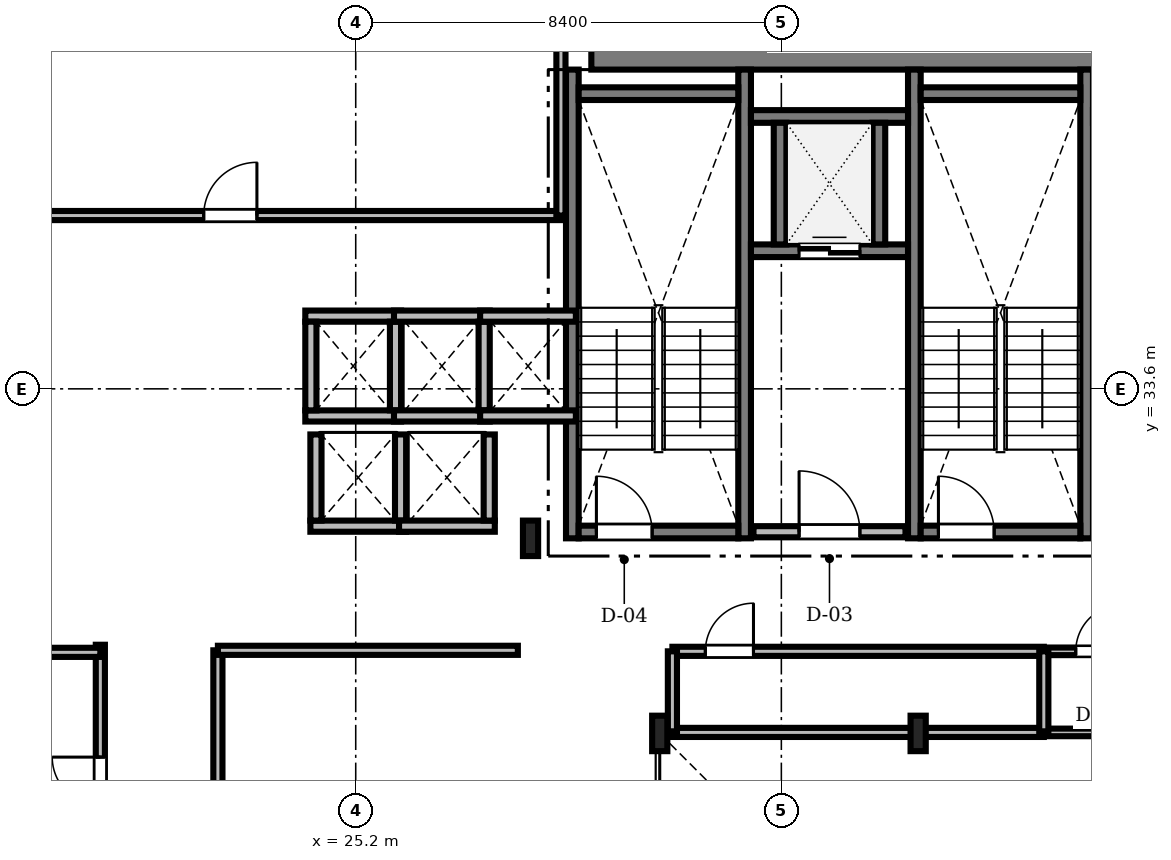
"""IFC4 building model, lengths in metres.
Left out: names, types, materials, properties, quantities, classifications, styles, units other than length and angle.
Written with IfcOpenShell. Run it as: python <this file> out.ifc"""

import sys

from ifc_helpers import new_model, si_unit, direction, frame, frame_2d, origin, origin_2d, place, context, subcontext, project, spatial, rectangle, i_section, extrude, source, transform, mapped, element, fill, save


model = new_model("IFC4")
c1 = context("Model", 3, precision=1e-05, world=origin(), true_north=direction((0.0, 1.0)))
c2 = subcontext(c1, "Body", "Model", "MODEL_VIEW")
j1 = project(units=[si_unit("LENGTHUNIT", "METRE"), si_unit("PLANEANGLEUNIT", "RADIAN")], contexts=[c1])
p1 = place(None, origin())
s1 = spatial("IfcSite", under=j1, at=p1, CompositionType="ELEMENT")
p2 = place(p1, origin())
s2 = spatial("IfcBuilding", under=s1, at=p2, CompositionType="ELEMENT")
p3 = place(p2, frame((0.0, 0.0, 177.2)))
s3 = spatial("IfcBuildingStorey", under=s2, at=p3, CompositionType="ELEMENT", Elevation=177.2)
m1 = source(origin(), c2, "Body", "SweptSolid", [
    extrude(rectangle(XDim=17.52, YDim=0.8, at=frame_2d((8.76, 0.0))), origin(), (0.0, 0.0, 1.0), 3.58),
])
p4 = place(p3, frame((29.85, 40.3, 0.0), z_axis=(0.0, 0.0, 1.0), x_axis=(1.0, 0.0, 0.0)))
e1 = element("IfcWall", 1, at=p4, inside=s3, PredefinedType="SHEAR", context=c2, shape_type="MappedRepresentation", body=[
    mapped(m1, transform((0.0, 0.0, 0.0), scale=1.0)),
])
m2 = source(origin(), c2, "Body", "SweptSolid", [
    extrude(i_section(OverallWidth=0.3, OverallDepth=0.7, WebThickness=0.017, FlangeThickness=0.032, FilletRadius=0.027, at=origin_2d()), origin(), (0.0, 0.0, 1.0), 3.58),
])
for number, where, z_axis, x_axis in (
    (2, (36.3, 26.8, 0.0), (0.0, 0.0, 1.0), (1.0, 0.0, 0.0)),
    (3, (31.2, 26.8, 0.0), (0.0, 0.0, 1.0), (1.0, 0.0, 0.0)),
    (4, (28.65, 30.65, 0.0), (0.0, 0.0, 1.0), (1.0, 0.0, 0.0)),
):
    element("IfcColumn", number, at=place(p3, frame(where, z_axis=z_axis, x_axis=x_axis)), inside=s3, PredefinedType="COLUMN", context=c2, shape_type="MappedRepresentation", body=[
        mapped(m2, transform((0.0, 0.0, 0.0), scale=1.0)),
    ])
m3 = source(origin(), c2, "Body", "SweptSolid", [
    extrude(rectangle(XDim=9.25, YDim=0.25, at=frame_2d((4.625, 0.0))), origin(), (0.0, 0.0, 1.0), 3.6),
])
for number, where, z_axis, x_axis in (
    (5, (29.475, 30.65, 0.0), (0.0, 0.0, 1.0), (0.0, 1.0, 0.0)),
    (6, (32.875, 30.65, 0.0), (0.0, 0.0, 1.0), (0.0, 1.0, 0.0)),
):
    element("IfcWall", number, at=place(p3, frame(where, z_axis=z_axis, x_axis=x_axis)), inside=s3, PredefinedType="SOLIDWALL", context=c2, shape_type="MappedRepresentation", body=[
        mapped(m3, transform((0.0, 0.0, 0.0), scale=1.0)),
    ])
m4 = source(origin(), c2, "Body", "SweptSolid", [
    extrude(rectangle(XDim=3.15, YDim=0.25, at=frame_2d((1.575, 0.0))), origin(), (0.0, 0.0, 1.0), 3.6),
])
p5 = place(p3, frame((29.6, 39.425, 0.0), z_axis=(0.0, 0.0, 1.0), x_axis=(1.0, 0.0, 0.0)))
e7 = element("IfcWall", 7, at=p5, inside=s3, PredefinedType="SOLIDWALL", context=c2, shape_type="MappedRepresentation", body=[
    mapped(m4, transform((0.0, 0.0, 0.0), scale=1.0)),
])
p6 = place(p3, frame((29.6, 30.775, 0.0), z_axis=(0.0, 0.0, 1.0), x_axis=(1.0, 0.0, 0.0)))
e8 = element("IfcWall", 8, at=p6, inside=s3, PredefinedType="SOLIDWALL", context=c2, shape_type="MappedRepresentation", body=[
    mapped(m4, transform((0.0, 0.0, 0.0), scale=1.0)),
])
m5 = source(origin(), c2, "Body", "SweptSolid", [
    extrude(rectangle(XDim=1.1, YDim=2.2, at=frame_2d((0.55, 1.1))), frame((0.0, 0.135, 0.0), z_axis=(0.0, -1.0, 0.0), x_axis=(1.0, 0.0, 0.0)), (0.0, 0.0, 1.0), 0.27),
])
p7 = place(p6, frame((0.35, 0.0, 0.0)))
e9 = element("IfcOpeningElement", 9, at=p7, cuts=e8, PredefinedType="OPENING", context=c2, shape_type="MappedRepresentation", body=[
    mapped(m5, transform((0.0, 0.0, 0.0), scale=1.0)),
])
for number, where, z_axis, x_axis in (
    (10, (36.225, 30.65, 0.0), (0.0, 0.0, 1.0), (0.0, 1.0, 0.0)),
    (11, (39.625, 30.65, 0.0), (0.0, 0.0, 1.0), (0.0, 1.0, 0.0)),
):
    element("IfcWall", number, at=place(p3, frame(where, z_axis=z_axis, x_axis=x_axis)), inside=s3, PredefinedType="SOLIDWALL", context=c2, shape_type="MappedRepresentation", body=[
        mapped(m3, transform((0.0, 0.0, 0.0), scale=1.0)),
    ])
p8 = place(p3, frame((36.35, 39.425, 0.0), z_axis=(0.0, 0.0, 1.0), x_axis=(1.0, 0.0, 0.0)))
e12 = element("IfcWall", 12, at=p8, inside=s3, PredefinedType="SOLIDWALL", context=c2, shape_type="MappedRepresentation", body=[
    mapped(m4, transform((0.0, 0.0, 0.0), scale=1.0)),
])
p9 = place(p3, frame((36.35, 30.775, 0.0), z_axis=(0.0, 0.0, 1.0), x_axis=(1.0, 0.0, 0.0)))
e13 = element("IfcWall", 13, at=p9, inside=s3, PredefinedType="SOLIDWALL", context=c2, shape_type="MappedRepresentation", body=[
    mapped(m4, transform((0.0, 0.0, 0.0), scale=1.0)),
])
p10 = place(p9, frame((0.35, 0.0, 0.0)))
e14 = element("IfcOpeningElement", 14, at=p10, cuts=e13, PredefinedType="OPENING", context=c2, shape_type="MappedRepresentation", body=[
    mapped(m5, transform((0.0, 0.0, 0.0), scale=1.0)),
])
m6 = source(origin(), c2, "Body", "SweptSolid", [
    extrude(rectangle(XDim=3.0, YDim=0.22, at=frame_2d((1.5, 0.0))), origin(), (0.0, 0.0, 1.0), 3.58),
])
p11 = place(p3, frame((33.05, 30.78, 0.0), z_axis=(0.0, 0.0, 1.0), x_axis=(1.0, 0.0, 0.0)))
e15 = element("IfcWall", 15, at=p11, inside=s3, PredefinedType="SOLIDWALL", context=c2, shape_type="MappedRepresentation", body=[
    mapped(m6, transform((0.0, 0.0, 0.0), scale=1.0)),
])
m7 = source(origin(), c2, "Body", "SweptSolid", [
    extrude(rectangle(XDim=1.2, YDim=2.2, at=frame_2d((0.6, 1.1))), frame((0.0, 0.12, 0.0), z_axis=(0.0, -1.0, 0.0), x_axis=(1.0, 0.0, 0.0)), (0.0, 0.0, 1.0), 0.24),
])
p12 = place(p11, frame((0.9, 0.0, 0.0)))
e16 = element("IfcOpeningElement", 16, at=p12, cuts=e15, PredefinedType="OPENING", context=c2, shape_type="MappedRepresentation", body=[
    mapped(m7, transform((0.0, 0.0, 0.0), scale=1.0)),
])
m8 = source(origin(), c2, "Body", "SweptSolid", [
    extrude(rectangle(XDim=1.89, YDim=0.22, at=frame_2d((0.945, 0.0))), origin(), (0.0, 0.0, 1.0), 3.58),
])
for number, where, z_axis, x_axis in (
    (17, (24.205, 33.065, 0.0), (0.0, 0.0, 1.0), (1.0, 0.0, 0.0)),
    (18, (24.205, 35.035, 0.0), (0.0, 0.0, 1.0), (1.0, 0.0, 0.0)),
):
    element("IfcWall", number, at=place(p3, frame(where, z_axis=z_axis, x_axis=x_axis)), inside=s3, PredefinedType="SOLIDWALL", context=c2, shape_type="MappedRepresentation", body=[
        mapped(m8, transform((0.0, 0.0, 0.0), scale=1.0)),
    ])
m9 = source(origin(), c2, "Body", "SweptSolid", [
    extrude(rectangle(XDim=1.75, YDim=0.22, at=frame_2d((0.875, 0.0))), origin(), (0.0, 0.0, 1.0), 3.58),
])
for number, where, z_axis, x_axis in (
    (19, (24.315, 33.175, 0.0), (0.0, 0.0, 1.0), (0.0, 1.0, 0.0)),
    (20, (25.985, 33.175, 0.0), (0.0, 0.0, 1.0), (0.0, 1.0, 0.0)),
):
    element("IfcWall", number, at=place(p3, frame(where, z_axis=z_axis, x_axis=x_axis)), inside=s3, PredefinedType="SOLIDWALL", context=c2, shape_type="MappedRepresentation", body=[
        mapped(m9, transform((0.0, 0.0, 0.0), scale=1.0)),
    ])
for number, where, z_axis, x_axis in (
    (21, (25.955, 33.065, 0.0), (0.0, 0.0, 1.0), (1.0, 0.0, 0.0)),
    (22, (25.955, 35.035, 0.0), (0.0, 0.0, 1.0), (1.0, 0.0, 0.0)),
):
    element("IfcWall", number, at=place(p3, frame(where, z_axis=z_axis, x_axis=x_axis)), inside=s3, PredefinedType="SOLIDWALL", context=c2, shape_type="MappedRepresentation", body=[
        mapped(m8, transform((0.0, 0.0, 0.0), scale=1.0)),
    ])
p13 = place(p3, frame((27.735, 33.175, 0.0), z_axis=(0.0, 0.0, 1.0), x_axis=(0.0, 1.0, 0.0)))
e23 = element("IfcWall", 23, at=p13, inside=s3, PredefinedType="SOLIDWALL", context=c2, shape_type="MappedRepresentation", body=[
    mapped(m9, transform((0.0, 0.0, 0.0), scale=1.0)),
])
for number, where, z_axis, x_axis in (
    (24, (27.655, 33.065, 0.0), (0.0, 0.0, 1.0), (1.0, 0.0, 0.0)),
    (25, (27.655, 35.035, 0.0), (0.0, 0.0, 1.0), (1.0, 0.0, 0.0)),
):
    element("IfcWall", number, at=place(p3, frame(where, z_axis=z_axis, x_axis=x_axis)), inside=s3, PredefinedType="SOLIDWALL", context=c2, shape_type="MappedRepresentation", body=[
        mapped(m8, transform((0.0, 0.0, 0.0), scale=1.0)),
    ])
m10 = source(origin(), c2, "Body", "SweptSolid", [
    extrude(rectangle(XDim=3.1, YDim=0.25, at=frame_2d((1.55, 0.0))), origin(), (0.0, 0.0, 1.0), 3.58),
])
p14 = place(p3, frame((33.0, 36.325, 0.0), z_axis=(0.0, 0.0, 1.0), x_axis=(1.0, 0.0, 0.0)))
e26 = element("IfcWall", 26, at=p14, inside=s3, PredefinedType="SOLIDWALL", context=c2, shape_type="MappedRepresentation", body=[
    mapped(m10, transform((0.0, 0.0, 0.0), scale=1.0)),
])
m11 = source(origin(), c2, "Body", "SweptSolid", [
    extrude(rectangle(XDim=1.2, YDim=2.25, at=frame_2d((0.6, 1.125))), frame((0.0, 0.135, 0.0), z_axis=(0.0, -1.0, 0.0), x_axis=(1.0, 0.0, 0.0)), (0.0, 0.0, 1.0), 0.27),
])
p15 = place(p14, frame((0.95, 0.0, 0.0)))
e27 = element("IfcOpeningElement", 27, at=p15, cuts=e26, PredefinedType="OPENING", context=c2, shape_type="MappedRepresentation", body=[
    mapped(m11, transform((0.0, 0.0, 0.0), scale=1.0)),
])
p16 = place(p3, frame((33.0, 38.975, 0.0), z_axis=(0.0, 0.0, 1.0), x_axis=(1.0, 0.0, 0.0)))
e28 = element("IfcWall", 28, at=p16, inside=s3, PredefinedType="SOLIDWALL", context=c2, shape_type="MappedRepresentation", body=[
    mapped(m10, transform((0.0, 0.0, 0.0), scale=1.0)),
])
m12 = source(origin(), c2, "Body", "SweptSolid", [
    extrude(rectangle(XDim=2.4, YDim=0.25, at=frame_2d((1.2, 0.0))), origin(), (0.0, 0.0, 1.0), 3.58),
])
for number, where, z_axis, x_axis in (
    (29, (33.575, 36.45, 0.0), (0.0, 0.0, 1.0), (0.0, 1.0, 0.0)),
    (30, (35.525, 36.45, 0.0), (0.0, 0.0, 1.0), (0.0, 1.0, 0.0)),
):
    element("IfcWall", number, at=place(p3, frame(where, z_axis=z_axis, x_axis=x_axis)), inside=s3, PredefinedType="SOLIDWALL", context=c2, shape_type="MappedRepresentation", body=[
        mapped(m12, transform((0.0, 0.0, 0.0), scale=1.0)),
    ])
m13 = source(origin(), c2, "Body", "SweptSolid", [
    extrude(rectangle(XDim=1.89, YDim=0.22, at=frame_2d((0.945, 0.0))), origin(), (0.0, 0.0, 1.0), 3.58),
])
p17 = place(p3, frame((24.305, 30.89, 0.0), z_axis=(0.0, 0.0, 1.0), x_axis=(1.0, 0.0, 0.0)))
e31 = element("IfcWall", 31, at=p17, inside=s3, PredefinedType="SOLIDWALL", context=c2, shape_type="MappedRepresentation", body=[
    mapped(m13, transform((0.0, 0.0, 0.0), scale=1.0)),
])
m14 = source(origin(), c2, "Body", "SweptSolid", [
    extrude(rectangle(XDim=1.7, YDim=0.22, at=frame_2d((0.85, 0.0))), origin(), (0.0, 0.0, 1.0), 3.022),
])
for number, where, z_axis, x_axis in (
    (32, (24.415, 31.0, 0.0), (0.0, 0.0, 1.0), (0.0, 1.0, 0.0)),
    (33, (26.085, 31.0, 0.0), (0.0, 0.0, 1.0), (0.0, 1.0, 0.0)),
):
    element("IfcWall", number, at=place(p3, frame(where, z_axis=z_axis, x_axis=x_axis)), inside=s3, PredefinedType="SOLIDWALL", context=c2, shape_type="MappedRepresentation", body=[
        mapped(m14, transform((0.0, 0.0, 0.0), scale=1.0)),
    ])
m15 = source(origin(), c2, "Body", "SweptSolid", [
    extrude(rectangle(XDim=1.89, YDim=0.22, at=frame_2d((0.945, 0.0))), origin(), (0.0, 0.0, 1.0), 3.022),
])
p18 = place(p3, frame((26.055, 30.89, 0.0), z_axis=(0.0, 0.0, 1.0), x_axis=(1.0, 0.0, 0.0)))
e34 = element("IfcWall", 34, at=p18, inside=s3, PredefinedType="SOLIDWALL", context=c2, shape_type="MappedRepresentation", body=[
    mapped(m15, transform((0.0, 0.0, 0.0), scale=1.0)),
])
p19 = place(p3, frame((27.835, 31.0, 0.0), z_axis=(0.0, 0.0, 1.0), x_axis=(0.0, 1.0, 0.0)))
e35 = element("IfcWall", 35, at=p19, inside=s3, PredefinedType="SOLIDWALL", context=c2, shape_type="MappedRepresentation", body=[
    mapped(m14, transform((0.0, 0.0, 0.0), scale=1.0)),
])
m16 = source(origin(), c2, "Body", "SweptSolid", [
    extrude(rectangle(XDim=17.828, YDim=0.18, at=frame_2d((8.914, 0.0))), origin(), (0.0, 0.0, 1.0), 2.822),
])
p20 = place(p3, frame((11.422, 37.02, 0.0), z_axis=(0.0, 0.0, 1.0), x_axis=(1.0, 0.0, 0.0)))
e36 = element("IfcWall", 36, at=p20, inside=s3, PredefinedType="PARTITIONING", context=c2, shape_type="MappedRepresentation", body=[
    mapped(m16, transform((0.0, 0.0, 0.0), scale=1.0)),
])
m17 = source(origin(), c2, "Body", "SweptSolid", [
    extrude(rectangle(XDim=1.05, YDim=2.2, at=frame_2d((0.525, 1.1))), frame((0.0, 0.1, 0.0), z_axis=(0.0, -1.0, 0.0), x_axis=(1.0, 0.0, 0.0)), (0.0, 0.0, 1.0), 0.2),
])
p21 = place(p20, frame((10.778, 0.0, 0.0)))
e37 = element("IfcOpeningElement", 37, at=p21, cuts=e36, PredefinedType="OPENING", context=c2, shape_type="MappedRepresentation", body=[
    mapped(m17, transform((0.0, 0.0, 0.0), scale=1.0)),
])
m18 = source(origin(), c2, "Body", "SweptSolid", [
    extrude(rectangle(XDim=15.04, YDim=0.18, at=frame_2d((7.52, 0.0))), origin(), (0.0, 0.0, 1.0), 3.022),
])
p22 = place(p3, frame((20.16, 13.51, 0.0), z_axis=(0.0, 0.0, 1.0), x_axis=(0.0, 1.0, 0.0)))
e38 = element("IfcWall", 38, at=p22, inside=s3, PredefinedType="PARTITIONING", context=c2, shape_type="MappedRepresentation", body=[
    mapped(m18, transform((0.0, 0.0, 0.0), scale=1.0)),
])
p23 = place(p22, frame((3.202, 0.0, 0.0)))
e39 = element("IfcOpeningElement", 39, at=p23, cuts=e38, PredefinedType="OPENING", context=c2, shape_type="MappedRepresentation", body=[
    mapped(m17, transform((0.0, 0.0, 0.0), scale=1.0)),
])
m19 = source(origin(), c2, "Body", "SweptSolid", [
    extrude(rectangle(XDim=0.95, YDim=2.15, at=frame_2d((0.475, 1.075))), frame((0.0, 0.1, 0.0), z_axis=(0.0, -1.0, 0.0), x_axis=(1.0, 0.0, 0.0)), (0.0, 0.0, 1.0), 0.2),
])
p24 = place(p22, frame((11.873, 0.0, 0.0)))
e40 = element("IfcOpeningElement", 40, at=p24, cuts=e38, PredefinedType="OPENING", context=c2, shape_type="MappedRepresentation", body=[
    mapped(m19, transform((0.0, 0.0, 0.0), scale=1.0)),
])
m20 = source(origin(), c2, "Body", "SweptSolid", [
    extrude(rectangle(XDim=11.94, YDim=0.18, at=frame_2d((5.97, 0.0))), origin(), (0.0, 0.0, 1.0), 3.022),
])
p25 = place(p3, frame((22.48, 16.5, 0.0), z_axis=(0.0, 0.0, 1.0), x_axis=(0.0, 1.0, 0.0)))
e41 = element("IfcWall", 41, at=p25, inside=s3, PredefinedType="PARTITIONING", context=c2, shape_type="MappedRepresentation", body=[
    mapped(m20, transform((0.0, 0.0, 0.0), scale=1.0)),
])
p26 = place(p25, frame((4.5, 0.0, 0.0)))
e42 = element("IfcOpeningElement", 42, at=p26, cuts=e41, PredefinedType="OPENING", context=c2, shape_type="MappedRepresentation", body=[
    mapped(m17, transform((0.0, 0.0, 0.0), scale=1.0)),
])
m21 = source(origin(), c2, "Body", "SweptSolid", [
    extrude(rectangle(XDim=7.33, YDim=0.18, at=frame_2d((3.665, 0.0))), origin(), (0.0, 0.0, 1.0), 3.212),
])
p27 = place(p3, frame((31.45, 28.42, 0.0), z_axis=(0.0, 0.0, 1.0), x_axis=(1.0, 0.0, 0.0)))
e43 = element("IfcWall", 43, at=p27, inside=s3, PredefinedType="PARTITIONING", context=c2, shape_type="MappedRepresentation", body=[
    mapped(m21, transform((0.0, 0.0, 0.0), scale=1.0)),
])
p28 = place(p27, frame((0.65, 0.0, 0.0)))
e44 = element("IfcOpeningElement", 44, at=p28, cuts=e43, PredefinedType="OPENING", context=c2, shape_type="MappedRepresentation", body=[
    mapped(m19, transform((0.0, 0.0, 0.0), scale=1.0)),
])
m22 = source(origin(), c2, "Body", "SweptSolid", [
    extrude(rectangle(XDim=2.74, YDim=0.15, at=frame_2d((1.37, 0.0))), origin(), (0.0, 0.0, 1.0), 3.58),
])
p29 = place(p3, frame((38.78, 28.42, 0.0), z_axis=(0.0, 0.0, 1.0), x_axis=(1.0, 0.0, 0.0)))
e45 = element("IfcWall", 45, at=p29, inside=s3, PredefinedType="PARTITIONING", context=c2, shape_type="MappedRepresentation", body=[
    mapped(m22, transform((0.0, 0.0, 0.0), scale=1.0)),
])
m23 = source(origin(), c2, "Body", "SweptSolid", [
    extrude(rectangle(XDim=0.92, YDim=2.1, at=frame_2d((0.46, 1.05))), frame((0.0, 0.085, 0.0), z_axis=(0.0, -1.0, 0.0), x_axis=(1.0, 0.0, 0.0)), (0.0, 0.0, 1.0), 0.17),
])
p30 = place(p29, frame((0.63, 0.0, 0.0)))
e46 = element("IfcOpeningElement", 46, at=p30, cuts=e45, PredefinedType="OPENING", context=c2, shape_type="MappedRepresentation", body=[
    mapped(m23, transform((0.0, 0.0, 0.0), scale=1.0)),
])
m24 = source(origin(), c2, "Body", "SweptSolid", [
    extrude(rectangle(XDim=11.258, YDim=0.18, at=frame_2d((5.629, 0.0))), origin(), (0.0, 0.0, 1.0), 2.822),
])
p31 = place(p3, frame((29.25, 37.02, 0.0), z_axis=(0.0, 0.0, 1.0), x_axis=(0.0, 1.0, 0.0)))
e47 = element("IfcWall", 47, at=p31, inside=s3, PredefinedType="PARTITIONING", context=c2, shape_type="MappedRepresentation", body=[
    mapped(m24, transform((0.0, 0.0, 0.0), scale=1.0)),
])
m25 = source(origin(), c2, "Body", "SweptSolid", [
    extrude(rectangle(XDim=8.93, YDim=0.18, at=frame_2d((4.465, 0.0))), origin(), (0.0, 0.0, 1.0), 2.822),
])
p32 = place(p3, frame((11.23, 28.4, 0.0), z_axis=(0.0, 0.0, 1.0), x_axis=(1.0, 0.0, 0.0)))
e48 = element("IfcWall", 48, at=p32, inside=s3, PredefinedType="PARTITIONING", context=c2, shape_type="MappedRepresentation", body=[
    mapped(m25, transform((0.0, 0.0, 0.0), scale=1.0)),
])
m26 = source(origin(), c2, "Body", "SweptSolid", [
    extrude(rectangle(XDim=7.33, YDim=0.18, at=frame_2d((3.665, 0.0))), origin(), (0.0, 0.0, 1.0), 3.122),
])
p33 = place(p3, frame((31.45, 26.82, 0.0), z_axis=(0.0, 0.0, 1.0), x_axis=(1.0, 0.0, 0.0)))
e49 = element("IfcWall", 49, at=p33, inside=s3, PredefinedType="PARTITIONING", context=c2, shape_type="MappedRepresentation", body=[
    mapped(m26, transform((0.0, 0.0, 0.0), scale=1.0)),
])
m27 = source(origin(), c2, "Body", "SweptSolid", [
    extrude(rectangle(XDim=5.92, YDim=0.18, at=frame_2d((2.96, 0.0))), origin(), (0.0, 0.0, 1.0), 3.58),
])
p34 = place(p3, frame((22.48, 28.44, 0.0), z_axis=(0.0, 0.0, 1.0), x_axis=(1.0, 0.0, 0.0)))
e50 = element("IfcWall", 50, at=p34, inside=s3, PredefinedType="PARTITIONING", context=c2, shape_type="MappedRepresentation", body=[
    mapped(m27, transform((0.0, 0.0, 0.0), scale=1.0)),
])
m28 = source(origin(), c2, "Body", "SweptSolid", [
    extrude(rectangle(XDim=2.74, YDim=0.15, at=frame_2d((1.37, 0.0))), origin(), (0.0, 0.0, 1.0), 3.022),
])
p35 = place(p3, frame((38.78, 26.82, 0.0), z_axis=(0.0, 0.0, 1.0), x_axis=(1.0, 0.0, 0.0)))
e51 = element("IfcWall", 51, at=p35, inside=s3, PredefinedType="PARTITIONING", context=c2, shape_type="MappedRepresentation", body=[
    mapped(m28, transform((0.0, 0.0, 0.0), scale=1.0)),
])
m29 = source(origin(), c2, "Body", "SweptSolid", [
    extrude(rectangle(XDim=1.6, YDim=0.18, at=frame_2d((0.8, 0.0))), origin(), (0.0, 0.0, 1.0), 3.122),
])
for number, where, z_axis, x_axis in (
    (52, (31.45, 26.82, 0.0), (0.0, 0.0, 1.0), (0.0, 1.0, 0.0)),
    (53, (38.78, 26.82, 0.0), (0.0, 0.0, 1.0), (0.0, 1.0, 0.0)),
):
    element("IfcWall", number, at=place(p3, frame(where, z_axis=z_axis, x_axis=x_axis)), inside=s3, PredefinedType="PARTITIONING", context=c2, shape_type="MappedRepresentation", body=[
        mapped(m29, transform((0.0, 0.0, 0.0), scale=1.0)),
    ])
m30 = source(origin(), c2, "Body", "SweptSolid", [
    extrude(rectangle(XDim=1.1, YDim=2.2, at=frame_2d((0.55, 1.1))), frame((0.0, 0.025, 0.0), z_axis=(0.0, -1.0, 0.0), x_axis=(1.0, 0.0, 0.0)), (0.0, 0.0, 1.0), 0.05),
])
p36 = place(p7, origin())
e54 = element("IfcDoor", 54, at=p36, inside=s3, OperationType="SINGLE_SWING_LEFT", PredefinedType="DOOR", context=c2, shape_type="MappedRepresentation", body=[
    mapped(m30, transform((0.0, 0.0, 0.0), scale=1.0)),
])
fill(e9, e54)
p37 = place(p10, origin())
e55 = element("IfcDoor", 55, at=p37, inside=s3, OperationType="SINGLE_SWING_LEFT", PredefinedType="DOOR", context=c2, shape_type="MappedRepresentation", body=[
    mapped(m30, transform((0.0, 0.0, 0.0), scale=1.0)),
])
fill(e14, e55)
m31 = source(origin(), c2, "Body", "SweptSolid", [
    extrude(rectangle(XDim=1.2, YDim=2.2, at=frame_2d((0.6, 1.1))), frame((0.0, 0.025, 0.0), z_axis=(0.0, -1.0, 0.0), x_axis=(1.0, 0.0, 0.0)), (0.0, 0.0, 1.0), 0.05),
])
p38 = place(p12, origin())
e56 = element("IfcDoor", 56, at=p38, inside=s3, OperationType="SINGLE_SWING_LEFT", PredefinedType="DOOR", context=c2, shape_type="MappedRepresentation", body=[
    mapped(m31, transform((0.0, 0.0, 0.0), scale=1.0)),
])
fill(e16, e56)
m32 = source(origin(), c2, "Body", "SweptSolid", [
    extrude(rectangle(XDim=1.2, YDim=2.25, at=frame_2d((0.6, 1.125))), frame((0.0, 0.025, 0.0), z_axis=(0.0, -1.0, 0.0), x_axis=(1.0, 0.0, 0.0)), (0.0, 0.0, 1.0), 0.05),
])
p39 = place(p15, origin())
e57 = element("IfcDoor", 57, at=p39, inside=s3, OperationType="DOUBLE_DOOR_SLIDING", PredefinedType="DOOR", context=c2, shape_type="MappedRepresentation", body=[
    mapped(m32, transform((0.0, 0.0, 0.0), scale=1.0)),
])
fill(e27, e57)
m33 = source(origin(), c2, "Body", "SweptSolid", [
    extrude(rectangle(XDim=1.05, YDim=2.2, at=frame_2d((0.525, 1.1))), frame((0.0, 0.025, 0.0), z_axis=(0.0, -1.0, 0.0), x_axis=(1.0, 0.0, 0.0)), (0.0, 0.0, 1.0), 0.05),
])
p40 = place(p21, origin())
e58 = element("IfcDoor", 58, at=p40, inside=s3, OperationType="SINGLE_SWING_RIGHT", PredefinedType="DOOR", context=c2, shape_type="MappedRepresentation", body=[
    mapped(m33, transform((0.0, 0.0, 0.0), scale=1.0)),
])
fill(e37, e58)
m34 = source(origin(), c2, "Body", "SweptSolid", [
    extrude(rectangle(XDim=0.95, YDim=2.15, at=frame_2d((0.475, 1.075))), frame((0.0, 0.025, 0.0), z_axis=(0.0, -1.0, 0.0), x_axis=(1.0, 0.0, 0.0)), (0.0, 0.0, 1.0), 0.05),
])
p41 = place(p24, origin())
e59 = element("IfcDoor", 59, at=p41, inside=s3, OperationType="SINGLE_SWING_RIGHT", PredefinedType="DOOR", context=c2, shape_type="MappedRepresentation", body=[
    mapped(m34, transform((0.0, 0.0, 0.0), scale=1.0)),
])
fill(e40, e59)
p42 = place(p28, origin())
e60 = element("IfcDoor", 60, at=p42, inside=s3, OperationType="SINGLE_SWING_RIGHT", PredefinedType="DOOR", context=c2, shape_type="MappedRepresentation", body=[
    mapped(m34, transform((0.0, 0.0, 0.0), scale=1.0)),
])
fill(e44, e60)
m35 = source(origin(), c2, "Body", "SweptSolid", [
    extrude(rectangle(XDim=0.92, YDim=2.1, at=frame_2d((0.46, 1.05))), frame((0.0, 0.025, 0.0), z_axis=(0.0, -1.0, 0.0), x_axis=(1.0, 0.0, 0.0)), (0.0, 0.0, 1.0), 0.05),
])
p43 = place(p30, origin())
e61 = element("IfcDoor", 61, at=p43, inside=s3, OperationType="SINGLE_SWING_RIGHT", PredefinedType="DOOR", context=c2, shape_type="MappedRepresentation", body=[
    mapped(m35, transform((0.0, 0.0, 0.0), scale=1.0)),
])
fill(e46, e61)
save(model, sys.argv[1])
